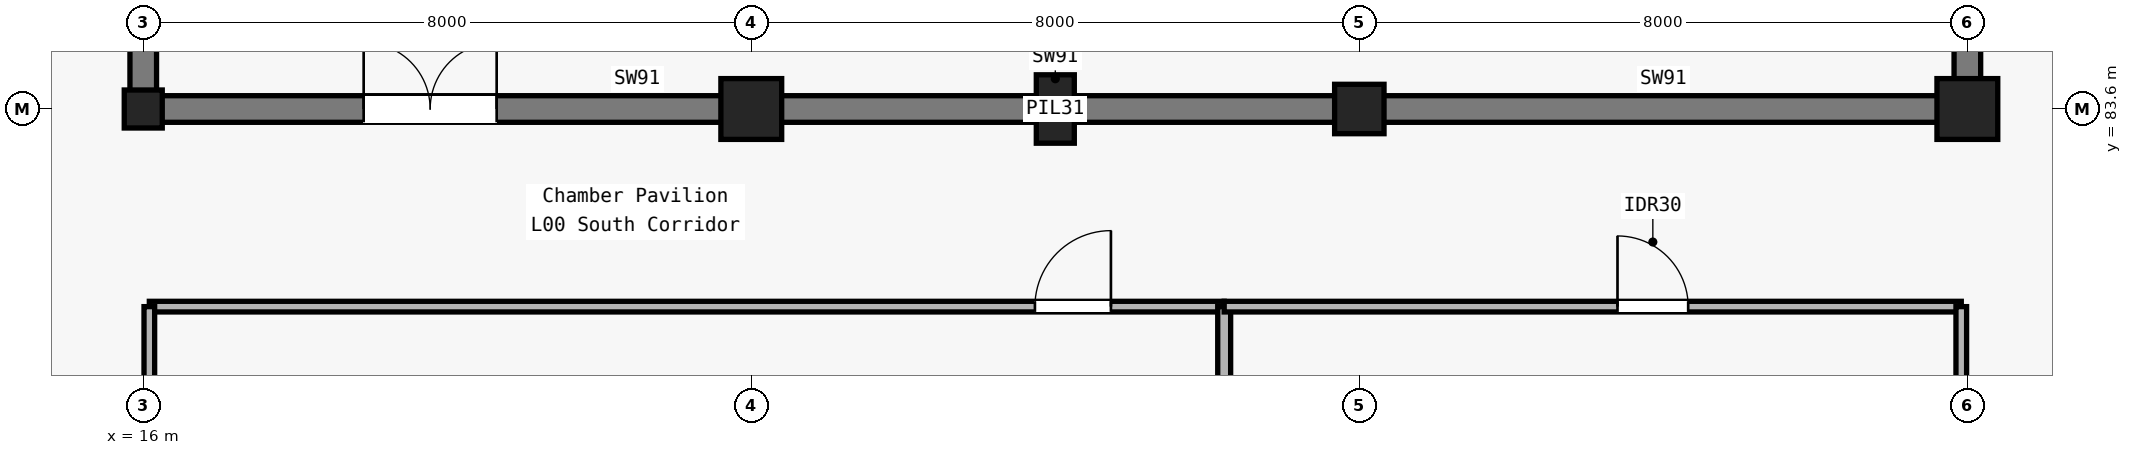
"""IFC4 building model, lengths in metres.
Left out: names, types, materials, properties, quantities, classifications, styles, units other than length and angle.
Written with IfcOpenShell. Run it as: python <this file> out.ifc"""

import sys

from ifc_helpers import new_model, si_unit, direction, frame, frame_2d, origin, origin_2d, place, context, subcontext, project, spatial, rectangle, circle, extrude, element, fill, save


model = new_model("IFC4")
c1 = context("Model", 3, precision=1e-05, world=origin(), true_north=direction((0.0, 1.0)))
c2 = subcontext(c1, "Body", "Model", "MODEL_VIEW")
j1 = project(units=[si_unit("LENGTHUNIT", "METRE"), si_unit("PLANEANGLEUNIT", "RADIAN")], contexts=[c1])
p1 = place(None, origin())
s1 = spatial("IfcSite", under=j1, at=p1, CompositionType="ELEMENT")
p2 = place(p1, origin())
s2 = spatial("IfcBuilding", under=s1, at=p2, CompositionType="ELEMENT")
p3 = place(p2, origin())
s3 = spatial("IfcBuildingStorey", under=s2, at=p3, CompositionType="ELEMENT", Elevation=0.0)
p4 = place(p3, frame((16.0, 83.6, 0.0), z_axis=(0.0, 0.0, 1.0), x_axis=(1.0, 0.0, 0.0)))
e1 = element("IfcColumn", 1, at=p4, inside=s3, PredefinedType="COLUMN", context=c2, shape_type="SweptSolid", body=[
    extrude(rectangle(XDim=0.5, YDim=0.5, at=origin_2d()), origin(), (0.0, 0.0, 1.0), 5.4),
])
p5 = place(p3, frame((24.0, 83.6, 0.0), z_axis=(0.0, 0.0, 1.0), x_axis=(1.0, 0.0, 0.0)))
e2 = element("IfcColumn", 2, at=p5, inside=s3, PredefinedType="COLUMN", context=c2, shape_type="SweptSolid", body=[
    extrude(circle(Radius=0.4, at=origin_2d()), origin(), (0.0, 0.0, 1.0), 5.4),
])
p6 = place(p3, frame((32.0, 83.6, 0.0), z_axis=(0.0, 0.0, 1.0), x_axis=(1.0, 0.0, 0.0)))
e3 = element("IfcColumn", 3, at=p6, inside=s3, PredefinedType="COLUMN", context=c2, shape_type="SweptSolid", body=[
    extrude(circle(Radius=0.325, at=origin_2d()), origin(), (0.0, 0.0, 1.0), 5.4),
])
p7 = place(p3, frame((40.0, 83.6, 0.0), z_axis=(0.0, 0.0, 1.0), x_axis=(1.0, 0.0, 0.0)))
e4 = element("IfcColumn", 4, at=p7, inside=s3, PredefinedType="COLUMN", context=c2, shape_type="SweptSolid", body=[
    extrude(rectangle(XDim=0.8, YDim=0.8, at=origin_2d()), origin(), (0.0, 0.0, 1.0), 5.4),
])
p8 = place(p3, frame((28.0, 83.6, 0.0), z_axis=(0.0, 0.0, 1.0), x_axis=(1.0, 0.0, 0.0)))
e5 = element("IfcColumn", 5, at=p8, inside=s3, PredefinedType="PILASTER", context=c2, shape_type="SweptSolid", body=[
    extrude(rectangle(XDim=0.5, YDim=0.9, at=origin_2d()), origin(), (0.0, 0.0, 1.0), 5.4),
])
p9 = place(p3, frame((16.0, 83.6, 0.0), z_axis=(0.0, 0.0, 1.0), x_axis=(1.0, 0.0, 0.0)))
e6 = element("IfcWall", 6, at=p9, inside=s3, PredefinedType="SHEAR", context=c2, shape_type="SweptSolid", body=[
    extrude(rectangle(XDim=8.0, YDim=0.35, at=frame_2d((4.0, 0.0))), origin(), (0.0, 0.0, 1.0), 5.1),
])
p10 = place(p9, frame((2.9, 0.0, 0.0)))
e7 = element("IfcOpeningElement", 7, at=p10, cuts=e6, PredefinedType="OPENING", context=c2, shape_type="SweptSolid", body=[
    extrude(rectangle(XDim=1.75, YDim=2.25, at=frame_2d((0.875, 1.125))), frame((0.0, 0.185, 0.0), z_axis=(0.0, -1.0, 0.0), x_axis=(1.0, 0.0, 0.0)), (0.0, 0.0, 1.0), 0.37),
])
for number, where, z_axis, x_axis in (
    (8, (24.0, 83.6, 0.0), (0.0, 0.0, 1.0), (1.0, 0.0, 0.0)),
    (9, (32.0, 83.6, 0.0), (0.0, 0.0, 1.0), (1.0, 0.0, 0.0)),
):
    element("IfcWall", number, at=place(p3, frame(where, z_axis=z_axis, x_axis=x_axis)), inside=s3, PredefinedType="SHEAR", context=c2, shape_type="SweptSolid", body=[
        extrude(rectangle(XDim=8.0, YDim=0.35, at=frame_2d((4.0, 0.0))), origin(), (0.0, 0.0, 1.0), 5.1),
    ])
p11 = place(p3, frame((16.0, 83.6, 0.0), z_axis=(0.0, 0.0, 1.0), x_axis=(0.0, 1.0, 0.0)))
e10 = element("IfcWall", 10, at=p11, inside=s3, PredefinedType="SHEAR", context=c2, shape_type="SweptSolid", body=[
    extrude(rectangle(XDim=7.6, YDim=0.35, at=frame_2d((3.8, 0.0))), origin(), (0.0, 0.0, 1.0), 5.1),
])
p12 = place(p11, frame((2.9, 0.0, 0.0)))
e11 = element("IfcOpeningElement", 11, at=p12, cuts=e10, PredefinedType="OPENING", context=c2, shape_type="SweptSolid", body=[
    extrude(rectangle(XDim=1.75, YDim=2.25, at=frame_2d((0.875, 1.125))), frame((0.0, 0.185, 0.0), z_axis=(0.0, -1.0, 0.0), x_axis=(1.0, 0.0, 0.0)), (0.0, 0.0, 1.0), 0.37),
])
p13 = place(p3, frame((40.0, 83.6, 0.0), z_axis=(0.0, 0.0, 1.0), x_axis=(0.0, 1.0, 0.0)))
e12 = element("IfcWall", 12, at=p13, inside=s3, PredefinedType="SHEAR", context=c2, shape_type="SweptSolid", body=[
    extrude(rectangle(XDim=7.6, YDim=0.35, at=frame_2d((3.8, 0.0))), origin(), (0.0, 0.0, 1.0), 5.1),
])
p14 = place(p13, frame((2.9, 0.0, 0.0)))
e13 = element("IfcOpeningElement", 13, at=p14, cuts=e12, PredefinedType="OPENING", context=c2, shape_type="SweptSolid", body=[
    extrude(rectangle(XDim=1.75, YDim=2.25, at=frame_2d((0.875, 1.125))), frame((0.0, 0.185, 0.0), z_axis=(0.0, -1.0, 0.0), x_axis=(1.0, 0.0, 0.0)), (0.0, 0.0, 1.0), 0.37),
])
p15 = place(p3, frame((16.08, 81.0, 0.0), z_axis=(0.0, 0.0, 1.0), x_axis=(1.0, 0.0, 0.0)))
e14 = element("IfcWall", 14, at=p15, inside=s3, PredefinedType="PARTITIONING", context=c2, shape_type="SweptSolid", body=[
    extrude(rectangle(XDim=14.142, YDim=0.14, at=frame_2d((7.071, 0.0))), origin(), (0.0, 0.0, 1.0), 4.325),
])
p16 = place(p15, frame((11.652, 0.0, 0.0)))
e15 = element("IfcOpeningElement", 15, at=p16, cuts=e14, PredefinedType="OPENING", context=c2, shape_type="SweptSolid", body=[
    extrude(rectangle(XDim=1.0, YDim=2.05, at=frame_2d((0.5, 1.025))), frame((0.0, 0.08, 0.0), z_axis=(0.0, -1.0, 0.0), x_axis=(1.0, 0.0, 0.0)), (0.0, 0.0, 1.0), 0.16),
])
p17 = place(p3, frame((30.222, 68.48, 0.0), z_axis=(0.0, 0.0, 1.0), x_axis=(0.0, 1.0, 0.0)))
e16 = element("IfcWall", 16, at=p17, inside=s3, PredefinedType="PARTITIONING", context=c2, shape_type="SweptSolid", body=[
    extrude(rectangle(XDim=12.52, YDim=0.17, at=frame_2d((6.26, 0.0))), origin(), (0.0, 0.0, 1.0), 4.175),
])
p18 = place(p3, frame((30.222, 81.0, 0.0), z_axis=(0.0, 0.0, 1.0), x_axis=(1.0, 0.0, 0.0)))
e17 = element("IfcWall", 17, at=p18, inside=s3, PredefinedType="PARTITIONING", context=c2, shape_type="SweptSolid", body=[
    extrude(rectangle(XDim=9.698, YDim=0.14, at=frame_2d((4.849, 0.0))), origin(), (0.0, 0.0, 1.0), 4.275),
])
p19 = place(p18, frame((5.175, 0.0, 0.0)))
e18 = element("IfcOpeningElement", 18, at=p19, cuts=e17, PredefinedType="OPENING", context=c2, shape_type="SweptSolid", body=[
    extrude(rectangle(XDim=0.93, YDim=2.1, at=frame_2d((0.465, 1.05))), frame((0.0, 0.08, 0.0), z_axis=(0.0, -1.0, 0.0), x_axis=(1.0, 0.0, 0.0)), (0.0, 0.0, 1.0), 0.16),
])
p20 = place(p3, frame((16.08, 68.775, 0.0), z_axis=(0.0, 0.0, 1.0), x_axis=(0.0, 1.0, 0.0)))
e19 = element("IfcWall", 19, at=p20, inside=s3, PredefinedType="PARTITIONING", context=c2, shape_type="SweptSolid", body=[
    extrude(rectangle(XDim=12.225, YDim=0.14, at=frame_2d((6.113, 0.0))), origin(), (0.0, 0.0, 1.0), 3.29),
])
p21 = place(p3, frame((39.92, 68.8, 0.0), z_axis=(0.0, 0.0, 1.0), x_axis=(0.0, 1.0, 0.0)))
e20 = element("IfcWall", 20, at=p21, inside=s3, PredefinedType="PARTITIONING", context=c2, shape_type="SweptSolid", body=[
    extrude(rectangle(XDim=12.2, YDim=0.14, at=frame_2d((6.1, 0.0))), origin(), (0.0, 0.0, 1.0), 4.275),
])
p22 = place(p16, origin())
e21 = element("IfcDoor", 21, at=p22, inside=s3, OperationType="SINGLE_SWING_RIGHT", PredefinedType="DOOR", context=c2, shape_type="SweptSolid", body=[
    extrude(rectangle(XDim=1.0, YDim=2.05, at=frame_2d((0.5, 1.025))), frame((0.0, 0.025, 0.0), z_axis=(0.0, -1.0, 0.0), x_axis=(1.0, 0.0, 0.0)), (0.0, 0.0, 1.0), 0.05),
])
fill(e15, e21)
p23 = place(p19, origin())
e22 = element("IfcDoor", 22, at=p23, inside=s3, OperationType="SINGLE_SWING_LEFT", PredefinedType="DOOR", context=c2, shape_type="SweptSolid", body=[
    extrude(rectangle(XDim=0.93, YDim=2.1, at=frame_2d((0.465, 1.05))), frame((0.0, 0.025, 0.0), z_axis=(0.0, -1.0, 0.0), x_axis=(1.0, 0.0, 0.0)), (0.0, 0.0, 1.0), 0.05),
])
fill(e18, e22)
p24 = place(p10, origin())
e23 = element("IfcDoor", 23, at=p24, inside=s3, OperationType="DOUBLE_DOOR_SINGLE_SWING", PredefinedType="DOOR", context=c2, shape_type="SweptSolid", body=[
    extrude(rectangle(XDim=1.75, YDim=2.25, at=frame_2d((0.875, 1.125))), frame((0.0, 0.025, 0.0), z_axis=(0.0, -1.0, 0.0), x_axis=(1.0, 0.0, 0.0)), (0.0, 0.0, 1.0), 0.05),
])
fill(e7, e23)
save(model, sys.argv[1])
